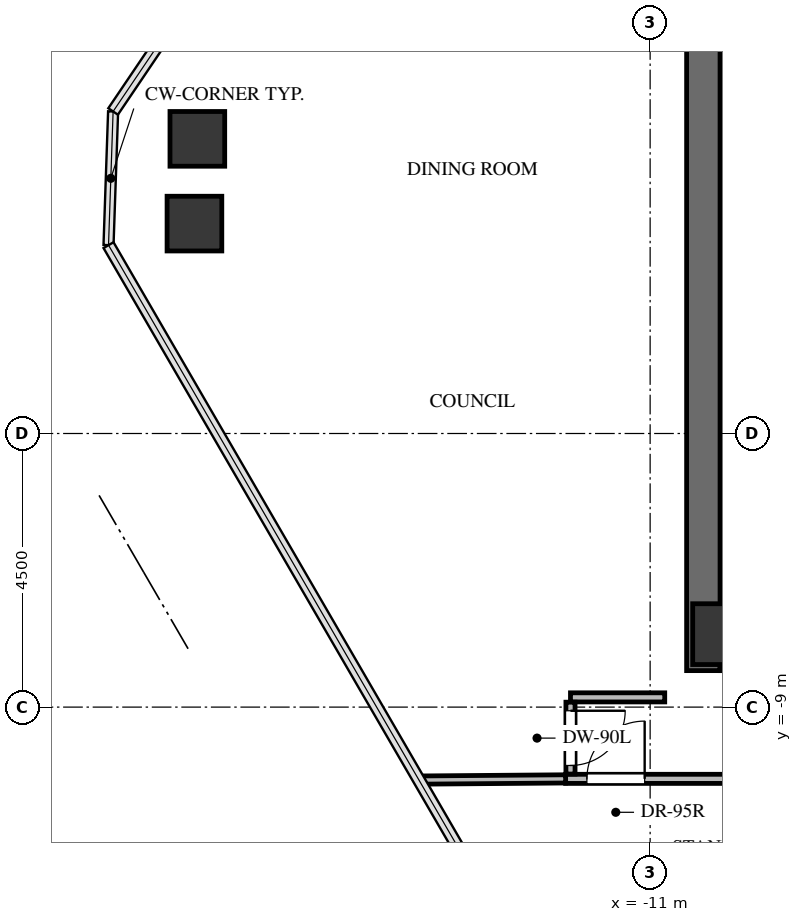
"""IFC4 building model, lengths in metres.
Left out: names, types, materials, properties, quantities, classifications, styles, units other than length and angle.
Written with IfcOpenShell. Run it as: python <this file> out.ifc"""

import sys

from ifc_helpers import new_model, si_unit, direction, frame, frame_2d, origin, origin_2d, place, context, subcontext, project, spatial, rectangle, extrude, source, transform, mapped, element, fill, save


model = new_model("IFC4")
c1 = context("Model", 3, precision=1e-05, world=origin(), true_north=direction((0.0, 1.0)))
c2 = subcontext(c1, "Body", "Model", "MODEL_VIEW")
j1 = project(units=[si_unit("LENGTHUNIT", "METRE"), si_unit("PLANEANGLEUNIT", "RADIAN")], contexts=[c1])
p1 = place(None, origin())
s1 = spatial("IfcSite", under=j1, at=p1, CompositionType="ELEMENT")
p2 = place(p1, origin())
s2 = spatial("IfcBuilding", under=s1, at=p2, CompositionType="ELEMENT")
p3 = place(p2, frame((0.0, 0.0, 234.8)))
s3 = spatial("IfcBuildingStorey", under=s2, at=p3, CompositionType="ELEMENT", Elevation=234.8)
p4 = place(p3, frame((-10.125, -8.4, 0.0), z_axis=(0.0, 0.0, 1.0), x_axis=(0.0, 1.0, 0.0)))
e1 = element("IfcWall", 1, at=p4, inside=s3, PredefinedType="SHEAR", context=c2, shape_type="SweptSolid", body=[
    extrude(rectangle(XDim=16.8, YDim=0.55, at=frame_2d((8.4, 0.0))), origin(), (0.0, 0.0, 1.0), 3.3),
])
p5 = place(p3, frame((-9.85, -8.125, 0.0), z_axis=(0.0, 0.0, 1.0), x_axis=(1.0, 0.0, 0.0)))
e2 = element("IfcWall", 2, at=p5, inside=s3, PredefinedType="SHEAR", context=c2, shape_type="SweptSolid", body=[
    extrude(rectangle(XDim=7.75, YDim=0.55, at=frame_2d((3.875, 0.0))), origin(), (0.0, 0.0, 1.0), 3.3),
])
m1 = source(origin(), c2, "Body", "SweptSolid", [
    extrude(rectangle(XDim=1.0, YDim=1.0, at=origin_2d()), origin(), (0.0, 0.0, 1.0), 3.3),
])
p6 = place(p3, frame((-9.8, -7.8, -0.24), z_axis=(0.0, 0.0, 1.0), x_axis=(1.0, 0.0, 0.0)))
e3 = element("IfcColumn", 3, at=p6, inside=s3, PredefinedType="COLUMN", context=c2, shape_type="MappedRepresentation", body=[
    mapped(m1, transform((0.0, 0.0, 0.0), x_axis=(1.0, 0.0, 0.0), y_axis=(0.0, 1.0, 0.0), z_axis=(0.0, 0.0, 1.0), scale=1.0)),
])
m2 = source(origin(), c2, "Body", "SweptSolid", [
    extrude(rectangle(XDim=0.9, YDim=0.9, at=origin_2d()), origin(), (0.0, 0.0, 1.0), 3.3),
])
for number, where, z_axis, x_axis in (
    (4, (-18.494, -1.048, -0.24), (0.0, 0.0, 1.0), (1.0, 0.0, 0.0)),
    (5, (-18.446, 0.346, -0.24), (0.0, 0.0, 1.0), (1.0, 0.0, 0.0)),
):
    element("IfcColumn", number, at=place(p3, frame(where, z_axis=z_axis, x_axis=x_axis)), inside=s3, PredefinedType="COLUMN", context=c2, shape_type="MappedRepresentation", body=[
        mapped(m2, transform((0.0, 0.0, 0.0), x_axis=(1.0, 0.0, 0.0), y_axis=(0.0, 1.0, 0.0), z_axis=(0.0, 0.0, 1.0), scale=1.0)),
    ])
p7 = place(p3, frame((-12.39, -10.18, 0.0), z_axis=(0.0, 0.0, 1.0), x_axis=(1.0, 0.0, 0.0)))
e6 = element("IfcWall", 6, at=p7, inside=s3, PredefinedType="PARTITIONING", context=c2, shape_type="SweptSolid", body=[
    extrude(rectangle(XDim=6.43, YDim=0.15, at=frame_2d((3.215, 0.0))), origin(), (0.0, 0.0, 1.0), 3.045),
])
p8 = place(p7, frame((0.35, 0.0, 0.0)))
e7 = element("IfcOpeningElement", 7, at=p8, cuts=e6, PredefinedType="OPENING", context=c2, shape_type="SweptSolid", body=[
    extrude(rectangle(XDim=0.95, YDim=2.1, at=frame_2d((0.475, 1.05))), frame((0.0, 0.085, 0.0), z_axis=(0.0, -1.0, 0.0), x_axis=(1.0, 0.0, 0.0)), (0.0, 0.0, 1.0), 0.17),
])
p9 = place(p3, frame((-10.76, -8.84, 0.0), z_axis=(0.0, 0.0, 1.0), x_axis=(-1.0, 0.0, 0.0)))
e8 = element("IfcWall", 8, at=p9, inside=s3, PredefinedType="PARTITIONING", context=c2, shape_type="SweptSolid", body=[
    extrude(rectangle(XDim=1.55, YDim=0.15, at=frame_2d((0.775, 0.0))), origin(), (0.0, 0.0, 1.0), 3.045),
])
p10 = place(p3, frame((-12.31, -8.919, 0.0), z_axis=(0.0, 0.0, 1.0), x_axis=(0.0, -1.0, 0.0)))
e9 = element("IfcWall", 9, at=p10, inside=s3, PredefinedType="PARTITIONING", context=c2, shape_type="SweptSolid", body=[
    extrude(rectangle(XDim=1.182, YDim=0.15, at=frame_2d((0.591, 0.0))), origin(), (0.0, 0.0, 1.0), 3.045),
])
p11 = place(p10, frame((0.141, 0.0, 0.0)))
e10 = element("IfcOpeningElement", 10, at=p11, cuts=e9, PredefinedType="OPENING", context=c2, shape_type="SweptSolid", body=[
    extrude(rectangle(XDim=0.9, YDim=2.05, at=frame_2d((0.45, 1.025))), frame((0.0, 0.085, 0.0), z_axis=(0.0, -1.0, 0.0), x_axis=(1.0, 0.0, 0.0)), (0.0, 0.0, 1.0), 0.17),
])
p12 = place(p3, frame((-14.802, -10.2, 0.0), z_axis=(0.0, 0.0, 1.0), x_axis=(0.999968020968, 0.007997314604, 0.0)))
e11 = element("IfcWall", 11, at=p12, inside=s3, PredefinedType="PARTITIONING", context=c2, shape_type="SweptSolid", body=[
    extrude(rectangle(XDim=2.412, YDim=0.135, at=frame_2d((1.206, 0.0))), origin(), (0.0, 0.0, 1.0), 2.399),
])
m3 = source(origin(), c2, "Body", "SweptSolid", [
    extrude(rectangle(XDim=0.95, YDim=2.1, at=frame_2d((0.475, 1.05))), frame((0.0, 0.025, 0.0), z_axis=(0.0, -1.0, 0.0), x_axis=(1.0, 0.0, 0.0)), (0.0, 0.0, 1.0), 0.05),
])
p13 = place(p8, origin())
e12 = element("IfcDoor", 12, at=p13, inside=s3, OperationType="SINGLE_SWING_RIGHT", PredefinedType="DOOR", context=c2, shape_type="MappedRepresentation", body=[
    mapped(m3, transform((0.0, 0.0, 0.0), x_axis=(1.0, 0.0, 0.0), y_axis=(0.0, 1.0, 0.0), z_axis=(0.0, 0.0, 1.0), scale=1.0)),
])
fill(e7, e12)
m4 = source(origin(), c2, "Body", "SweptSolid", [
    extrude(rectangle(XDim=0.9, YDim=2.05, at=frame_2d((0.45, 1.025))), frame((0.0, 0.025, 0.0), z_axis=(0.0, -1.0, 0.0), x_axis=(1.0, 0.0, 0.0)), (0.0, 0.0, 1.0), 0.05),
])
p14 = place(p11, origin())
e13 = element("IfcDoor", 13, at=p14, inside=s3, OperationType="SINGLE_SWING_LEFT", PredefinedType="DOOR", context=c2, shape_type="MappedRepresentation", body=[
    mapped(m4, transform((0.0, 0.0, 0.0), x_axis=(1.0, 0.0, 0.0), y_axis=(0.0, 1.0, 0.0), z_axis=(0.0, 0.0, 1.0), scale=1.0)),
])
fill(e10, e13)
save(model, sys.argv[1])
